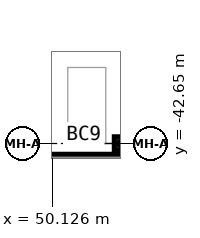
"""IFC4 building model, lengths in metres.
Left out: names, types, materials, properties, quantities, classifications, styles, units other than length and angle.
Written with IfcOpenShell. Run it as: python <this file> out.ifc"""

import sys

from ifc_helpers import new_model, si_unit, direction, frame, frame_2d, origin, origin_2d, place, context, subcontext, project, spatial, rectangle, extrude, source, transform, mapped, element, save


model = new_model("IFC4")
c1 = context("Model", 3, precision=1e-05, world=origin(), true_north=direction((0.0, 1.0)))
c2 = subcontext(c1, "Body", "Model", "MODEL_VIEW")
j1 = project(units=[si_unit("LENGTHUNIT", "METRE"), si_unit("PLANEANGLEUNIT", "RADIAN")], contexts=[c1])
p1 = place(None, origin())
s1 = spatial("IfcSite", under=j1, at=p1, CompositionType="ELEMENT")
p2 = place(p1, origin())
s2 = spatial("IfcBuilding", under=s1, at=p2, CompositionType="ELEMENT")
p3 = place(p2, frame((0.0, 0.0, -4.5)))
s3 = spatial("IfcBuildingStorey", under=s2, at=p3, CompositionType="ELEMENT", Elevation=-4.5)
m1 = source(origin(), c2, "Body", "SweptSolid", [
    extrude(rectangle(XDim=0.9, YDim=0.9, at=origin_2d()), origin(), (0.0, 0.0, 1.0), 4.5),
])
p4 = place(p3, frame((54.65, -42.65, 0.0), z_axis=(0.0, 0.0, 1.0), x_axis=(1.0, 0.0, 0.0)))
e1 = element("IfcColumn", 1, at=p4, inside=s3, PredefinedType="COLUMN", context=c2, shape_type="MappedRepresentation", body=[
    mapped(m1, transform((0.0, 0.0, 0.0))),
])
m2 = source(origin(), c2, "Body", "SweptSolid", [
    extrude(rectangle(XDim=15.35, YDim=0.5, at=frame_2d((7.675, 0.0))), origin(), (0.0, 0.0, 1.0), 4.5),
])
p5 = place(p3, frame((40.5, -43.6, 0.0), z_axis=(0.0, 0.0, 1.0), x_axis=(1.0, 0.0, 0.0)))
e2 = element("IfcWall", 2, at=p5, inside=s3, PredefinedType="SOLIDWALL", context=c2, shape_type="MappedRepresentation", body=[
    mapped(m2, transform((0.0, 0.0, 0.0))),
])
save(model, sys.argv[1])
